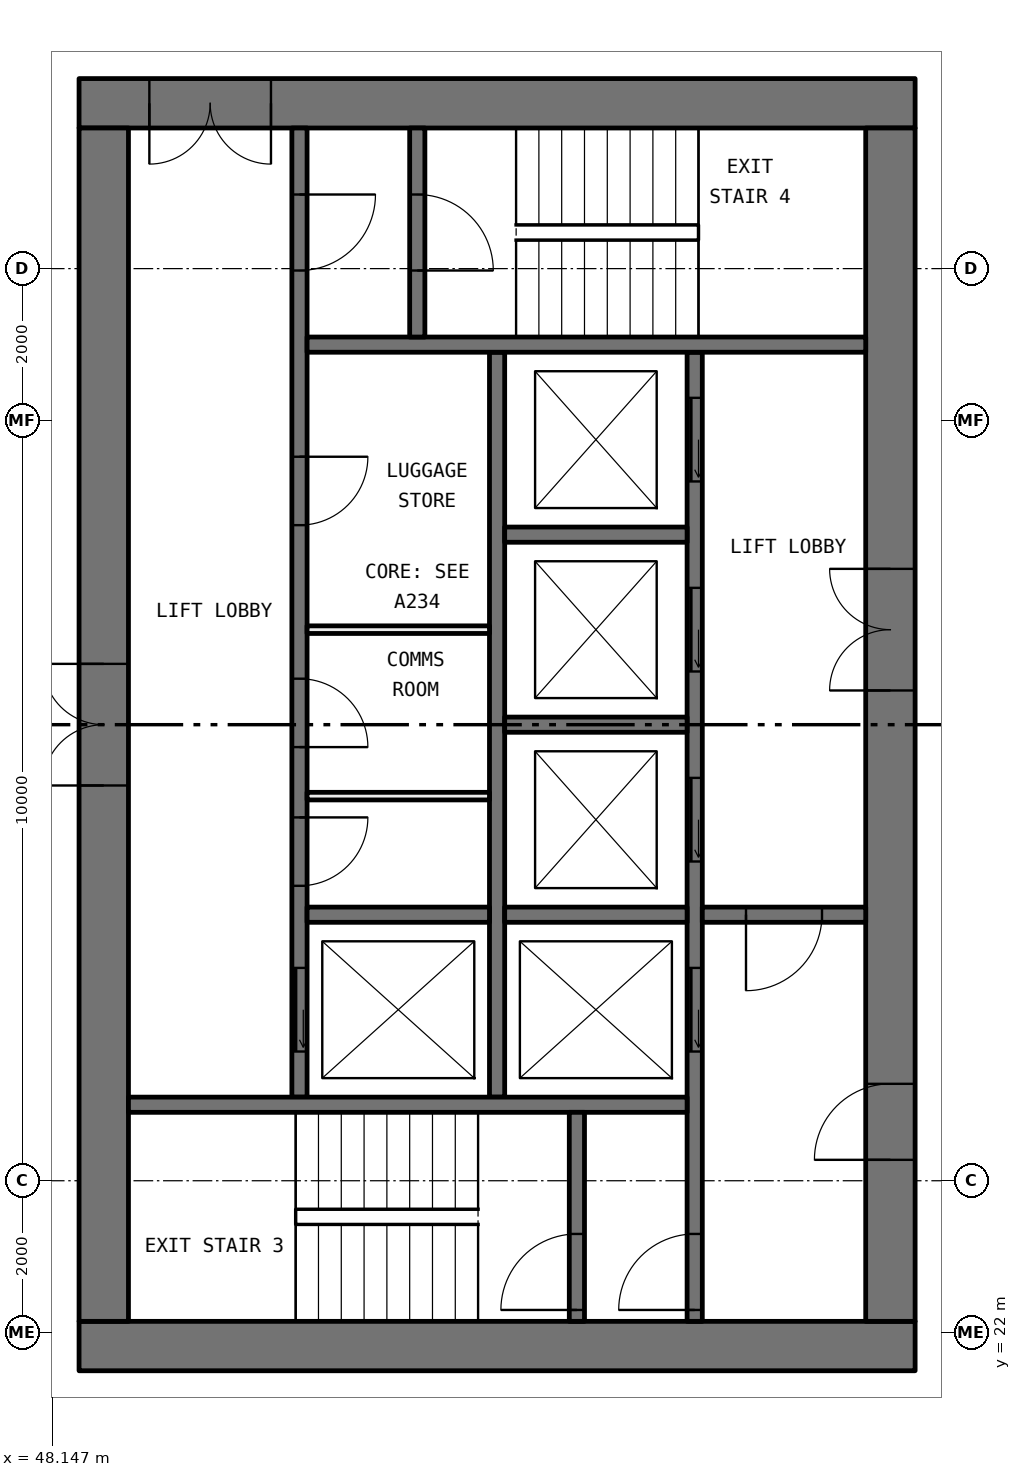
"""IFC4 building model, lengths in metres.
Left out: names, types, materials, properties, quantities, classifications, styles, units other than length and angle.
Written with IfcOpenShell. Run it as: python <this file> out.ifc"""

import sys

from ifc_helpers import new_model, si_unit, direction, frame, frame_2d, origin, place, context, subcontext, project, spatial, rectangle, extrude, element, fill, save


model = new_model("IFC4")
c1 = context("Model", 3, precision=1e-05, world=origin(), true_north=direction((0.0, 1.0)))
c2 = subcontext(c1, "Body", "Model", "MODEL_VIEW")
j1 = project(units=[si_unit("LENGTHUNIT", "METRE"), si_unit("PLANEANGLEUNIT", "RADIAN")], contexts=[c1])
p1 = place(None, origin())
s1 = spatial("IfcSite", under=j1, at=p1, CompositionType="ELEMENT")
p2 = place(p1, origin())
s2 = spatial("IfcBuilding", under=s1, at=p2, CompositionType="ELEMENT")
p3 = place(p2, frame((0.0, 0.0, 127.65)))
s3 = spatial("IfcBuildingStorey", under=s2, at=p3, CompositionType="ELEMENT", Elevation=127.65)
p4 = place(p3, frame((59.5, 21.825, 0.0), z_axis=(0.0, 0.0, 1.0), x_axis=(-1.0, 0.0, 0.0)))
e1 = element("IfcWall", 1, at=p4, inside=s3, PredefinedType="SHEAR", context=c2, shape_type="SweptSolid", body=[
    extrude(rectangle(XDim=11.0, YDim=0.65, at=frame_2d((5.5, 0.0))), origin(), (0.0, 0.0, 1.0), 3.05),
])
p5 = place(p3, frame((59.5, 38.175, 0.0), z_axis=(0.0, 0.0, 1.0), x_axis=(-1.0, 0.0, 0.0)))
e2 = element("IfcWall", 2, at=p5, inside=s3, PredefinedType="SHEAR", context=c2, shape_type="SweptSolid", body=[
    extrude(rectangle(XDim=11.0, YDim=0.65, at=frame_2d((5.5, 0.0))), origin(), (0.0, 0.0, 1.0), 3.05),
])
p6 = place(p5, frame((8.475, 0.0, 0.0)))
e3 = element("IfcOpeningElement", 3, at=p6, cuts=e2, PredefinedType="OPENING", context=c2, shape_type="SweptSolid", body=[
    extrude(rectangle(XDim=1.6, YDim=2.1, at=frame_2d((0.8, 1.05))), frame((0.0, 0.335, 0.0), z_axis=(0.0, -1.0, 0.0), x_axis=(1.0, 0.0, 0.0)), (0.0, 0.0, 1.0), 0.67),
])
p7 = place(p3, frame((59.175, 22.15, 0.0), z_axis=(0.0, 0.0, 1.0), x_axis=(0.0, 1.0, 0.0)))
e4 = element("IfcWall", 4, at=p7, inside=s3, PredefinedType="SHEAR", context=c2, shape_type="SweptSolid", body=[
    extrude(rectangle(XDim=15.7, YDim=0.65, at=frame_2d((7.85, 0.0))), origin(), (0.0, 0.0, 1.0), 3.05),
])
p8 = place(p7, frame((8.3, 0.0, 0.0)))
e5 = element("IfcOpeningElement", 5, at=p8, cuts=e4, PredefinedType="OPENING", context=c2, shape_type="SweptSolid", body=[
    extrude(rectangle(XDim=1.6, YDim=2.1, at=frame_2d((0.8, 1.05))), frame((0.0, 0.335, 0.0), z_axis=(0.0, -1.0, 0.0), x_axis=(1.0, 0.0, 0.0)), (0.0, 0.0, 1.0), 0.67),
])
p9 = place(p7, frame((2.125, 0.0, 0.0)))
e6 = element("IfcOpeningElement", 6, at=p9, cuts=e4, PredefinedType="OPENING", context=c2, shape_type="SweptSolid", body=[
    extrude(rectangle(XDim=1.0, YDim=2.1, at=frame_2d((0.5, 1.05))), frame((0.0, 0.335, 0.0), z_axis=(0.0, -1.0, 0.0), x_axis=(1.0, 0.0, 0.0)), (0.0, 0.0, 1.0), 0.67),
])
p10 = place(p3, frame((48.825, 22.15, 0.0), z_axis=(0.0, 0.0, 1.0), x_axis=(0.0, 1.0, 0.0)))
e7 = element("IfcWall", 7, at=p10, inside=s3, PredefinedType="SHEAR", context=c2, shape_type="SweptSolid", body=[
    extrude(rectangle(XDim=15.7, YDim=0.65, at=frame_2d((7.85, 0.0))), origin(), (0.0, 0.0, 1.0), 3.05),
])
p11 = place(p10, frame((7.05, 0.0, 0.0)))
e8 = element("IfcOpeningElement", 8, at=p11, cuts=e7, PredefinedType="OPENING", context=c2, shape_type="SweptSolid", body=[
    extrude(rectangle(XDim=1.6, YDim=2.1, at=frame_2d((0.8, 1.05))), frame((0.0, 0.335, 0.0), z_axis=(0.0, -1.0, 0.0), x_axis=(1.0, 0.0, 0.0)), (0.0, 0.0, 1.0), 0.67),
])
p12 = place(p3, frame((56.6, 22.15, 0.0), z_axis=(0.0, 0.0, 1.0), x_axis=(0.0, 1.0, 0.0)))
e9 = element("IfcWall", 9, at=p12, inside=s3, PredefinedType="SOLIDWALL", context=c2, shape_type="SweptSolid", body=[
    extrude(rectangle(XDim=12.75, YDim=0.2, at=frame_2d((6.375, 0.0))), origin(), (0.0, 0.0, 1.0), 3.05),
])
p13 = place(p12, frame((3.55, 0.0, 0.0)))
e10 = element("IfcOpeningElement", 10, at=p13, cuts=e9, PredefinedType="OPENING", context=c2, shape_type="SweptSolid", body=[
    extrude(rectangle(XDim=1.1, YDim=2.1, at=frame_2d((0.55, 1.05))), frame((0.0, 0.11, 0.0), z_axis=(0.0, -1.0, 0.0), x_axis=(1.0, 0.0, 0.0)), (0.0, 0.0, 1.0), 0.22),
])
p14 = place(p12, frame((6.05, 0.0, 0.0)))
e11 = element("IfcOpeningElement", 11, at=p14, cuts=e9, PredefinedType="OPENING", context=c2, shape_type="SweptSolid", body=[
    extrude(rectangle(XDim=1.1, YDim=2.1, at=frame_2d((0.55, 1.05))), frame((0.0, 0.11, 0.0), z_axis=(0.0, -1.0, 0.0), x_axis=(1.0, 0.0, 0.0)), (0.0, 0.0, 1.0), 0.22),
])
p15 = place(p12, frame((8.55, 0.0, 0.0)))
e12 = element("IfcOpeningElement", 12, at=p15, cuts=e9, PredefinedType="OPENING", context=c2, shape_type="SweptSolid", body=[
    extrude(rectangle(XDim=1.1, YDim=2.1, at=frame_2d((0.55, 1.05))), frame((0.0, 0.11, 0.0), z_axis=(0.0, -1.0, 0.0), x_axis=(1.0, 0.0, 0.0)), (0.0, 0.0, 1.0), 0.22),
])
p16 = place(p12, frame((11.05, 0.0, 0.0)))
e13 = element("IfcOpeningElement", 13, at=p16, cuts=e9, PredefinedType="OPENING", context=c2, shape_type="SweptSolid", body=[
    extrude(rectangle(XDim=1.1, YDim=2.1, at=frame_2d((0.55, 1.05))), frame((0.0, 0.11, 0.0), z_axis=(0.0, -1.0, 0.0), x_axis=(1.0, 0.0, 0.0)), (0.0, 0.0, 1.0), 0.22),
])
p17 = place(p12, frame((0.15, 0.0, 0.0)))
e14 = element("IfcOpeningElement", 14, at=p17, cuts=e9, PredefinedType="OPENING", context=c2, shape_type="SweptSolid", body=[
    extrude(rectangle(XDim=1.0, YDim=2.1, at=frame_2d((0.5, 1.05))), frame((0.0, 0.11, 0.0), z_axis=(0.0, -1.0, 0.0), x_axis=(1.0, 0.0, 0.0)), (0.0, 0.0, 1.0), 0.22),
])
p18 = place(p3, frame((51.4, 25.1, 0.0), z_axis=(0.0, 0.0, 1.0), x_axis=(0.0, 1.0, 0.0)))
e15 = element("IfcWall", 15, at=p18, inside=s3, PredefinedType="SOLIDWALL", context=c2, shape_type="SweptSolid", body=[
    extrude(rectangle(XDim=12.75, YDim=0.2, at=frame_2d((6.375, 0.0))), origin(), (0.0, 0.0, 1.0), 3.05),
])
p19 = place(p18, frame((0.6, 0.0, 0.0)))
e16 = element("IfcOpeningElement", 16, at=p19, cuts=e15, PredefinedType="OPENING", context=c2, shape_type="SweptSolid", body=[
    extrude(rectangle(XDim=1.1, YDim=2.1, at=frame_2d((0.55, 1.05))), frame((0.0, 0.11, 0.0), z_axis=(0.0, -1.0, 0.0), x_axis=(1.0, 0.0, 0.0)), (0.0, 0.0, 1.0), 0.22),
])
p20 = place(p18, frame((10.875, 0.0, 0.0)))
e17 = element("IfcOpeningElement", 17, at=p20, cuts=e15, PredefinedType="OPENING", context=c2, shape_type="SweptSolid", body=[
    extrude(rectangle(XDim=1.0, YDim=2.1, at=frame_2d((0.5, 1.05))), frame((0.0, 0.11, 0.0), z_axis=(0.0, -1.0, 0.0), x_axis=(1.0, 0.0, 0.0)), (0.0, 0.0, 1.0), 0.22),
])
p21 = place(p18, frame((2.78, 0.0, 0.0)))
e18 = element("IfcOpeningElement", 18, at=p21, cuts=e15, PredefinedType="OPENING", context=c2, shape_type="SweptSolid", body=[
    extrude(rectangle(XDim=0.9, YDim=2.1, at=frame_2d((0.45, 1.05))), frame((0.0, 0.11, 0.0), z_axis=(0.0, -1.0, 0.0), x_axis=(1.0, 0.0, 0.0)), (0.0, 0.0, 1.0), 0.22),
])
p22 = place(p18, frame((4.605, 0.0, 0.0)))
e19 = element("IfcOpeningElement", 19, at=p22, cuts=e15, PredefinedType="OPENING", context=c2, shape_type="SweptSolid", body=[
    extrude(rectangle(XDim=0.9, YDim=2.1, at=frame_2d((0.45, 1.05))), frame((0.0, 0.11, 0.0), z_axis=(0.0, -1.0, 0.0), x_axis=(1.0, 0.0, 0.0)), (0.0, 0.0, 1.0), 0.22),
])
p23 = place(p18, frame((7.525, 0.0, 0.0)))
e20 = element("IfcOpeningElement", 20, at=p23, cuts=e15, PredefinedType="OPENING", context=c2, shape_type="SweptSolid", body=[
    extrude(rectangle(XDim=0.9, YDim=2.1, at=frame_2d((0.45, 1.05))), frame((0.0, 0.11, 0.0), z_axis=(0.0, -1.0, 0.0), x_axis=(1.0, 0.0, 0.0)), (0.0, 0.0, 1.0), 0.22),
])
p24 = place(p3, frame((54.0, 25.1, 0.0), z_axis=(0.0, 0.0, 1.0), x_axis=(0.0, 1.0, 0.0)))
e21 = element("IfcWall", 21, at=p24, inside=s3, PredefinedType="SOLIDWALL", context=c2, shape_type="SweptSolid", body=[
    extrude(rectangle(XDim=9.8, YDim=0.2, at=frame_2d((4.9, 0.0))), origin(), (0.0, 0.0, 1.0), 3.05),
])
for number, where, z_axis, x_axis in (
    (22, (56.5, 25.0, 0.0), (0.0, 0.0, 1.0), (-1.0, 0.0, 0.0)),
    (23, (58.85, 35.0, 0.0), (0.0, 0.0, 1.0), (-1.0, 0.0, 0.0)),
):
    element("IfcWall", number, at=place(p3, frame(where, z_axis=z_axis, x_axis=x_axis)), inside=s3, PredefinedType="SOLIDWALL", context=c2, shape_type="SweptSolid", body=[
        extrude(rectangle(XDim=7.35, YDim=0.2, at=frame_2d((3.675, 0.0))), origin(), (0.0, 0.0, 1.0), 3.05),
    ])
p25 = place(p3, frame((58.85, 27.5, 0.0), z_axis=(0.0, 0.0, 1.0), x_axis=(-1.0, 0.0, 0.0)))
e24 = element("IfcWall", 24, at=p25, inside=s3, PredefinedType="SOLIDWALL", context=c2, shape_type="SweptSolid", body=[
    extrude(rectangle(XDim=2.15, YDim=0.2, at=frame_2d((1.075, 0.0))), origin(), (0.0, 0.0, 1.0), 3.05),
])
p26 = place(p25, frame((0.575, 0.0, 0.0)))
e25 = element("IfcOpeningElement", 25, at=p26, cuts=e24, PredefinedType="OPENING", context=c2, shape_type="SweptSolid", body=[
    extrude(rectangle(XDim=1.0, YDim=2.1, at=frame_2d((0.5, 1.05))), frame((0.0, 0.11, 0.0), z_axis=(0.0, -1.0, 0.0), x_axis=(1.0, 0.0, 0.0)), (0.0, 0.0, 1.0), 0.22),
])
p27 = place(p3, frame((55.05, 22.15, 0.0), z_axis=(0.0, 0.0, 1.0), x_axis=(0.0, 1.0, 0.0)))
e26 = element("IfcWall", 26, at=p27, inside=s3, PredefinedType="SOLIDWALL", context=c2, shape_type="SweptSolid", body=[
    extrude(rectangle(XDim=2.75, YDim=0.2, at=frame_2d((1.375, 0.0))), origin(), (0.0, 0.0, 1.0), 3.05),
])
p28 = place(p27, frame((0.15, 0.0, 0.0)))
e27 = element("IfcOpeningElement", 27, at=p28, cuts=e26, PredefinedType="OPENING", context=c2, shape_type="SweptSolid", body=[
    extrude(rectangle(XDim=1.0, YDim=2.1, at=frame_2d((0.5, 1.05))), frame((0.0, 0.11, 0.0), z_axis=(0.0, -1.0, 0.0), x_axis=(1.0, 0.0, 0.0)), (0.0, 0.0, 1.0), 0.22),
])
p29 = place(p3, frame((52.95, 35.1, 0.0), z_axis=(0.0, 0.0, 1.0), x_axis=(0.0, 1.0, 0.0)))
e28 = element("IfcWall", 28, at=p29, inside=s3, PredefinedType="SOLIDWALL", context=c2, shape_type="SweptSolid", body=[
    extrude(rectangle(XDim=2.75, YDim=0.2, at=frame_2d((1.375, 0.0))), origin(), (0.0, 0.0, 1.0), 3.05),
])
p30 = place(p29, frame((0.875, 0.0, 0.0)))
e29 = element("IfcOpeningElement", 29, at=p30, cuts=e28, PredefinedType="OPENING", context=c2, shape_type="SweptSolid", body=[
    extrude(rectangle(XDim=1.0, YDim=2.1, at=frame_2d((0.5, 1.05))), frame((0.0, 0.11, 0.0), z_axis=(0.0, -1.0, 0.0), x_axis=(1.0, 0.0, 0.0)), (0.0, 0.0, 1.0), 0.22),
])
for number, where, z_axis, x_axis in (
    (30, (56.5, 27.5, 0.0), (0.0, 0.0, 1.0), (-1.0, 0.0, 0.0)),
    (31, (56.5, 30.0, 0.0), (0.0, 0.0, 1.0), (-1.0, 0.0, 0.0)),
    (32, (56.5, 32.5, 0.0), (0.0, 0.0, 1.0), (-1.0, 0.0, 0.0)),
    (33, (53.9, 27.5, 0.0), (0.0, 0.0, 1.0), (-1.0, 0.0, 0.0)),
):
    element("IfcWall", number, at=place(p3, frame(where, z_axis=z_axis, x_axis=x_axis)), inside=s3, PredefinedType="SOLIDWALL", context=c2, shape_type="SweptSolid", body=[
        extrude(rectangle(XDim=2.4, YDim=0.2, at=frame_2d((1.2, 0.0))), origin(), (0.0, 0.0, 1.0), 3.05),
    ])
for number, where, z_axis, x_axis in (
    (34, (53.9, 29.06, 0.0), (0.0, 0.0, 1.0), (-1.0, 0.0, 0.0)),
    (35, (53.9, 31.25, 0.0), (0.0, 0.0, 1.0), (-1.0, 0.0, 0.0)),
):
    element("IfcWall", number, at=place(p3, frame(where, z_axis=z_axis, x_axis=x_axis)), inside=s3, PredefinedType="PARTITIONING", context=c2, shape_type="SweptSolid", body=[
        extrude(rectangle(XDim=2.4, YDim=0.1, at=frame_2d((1.2, 0.0))), origin(), (0.0, 0.0, 1.0), 3.05),
    ])
p31 = place(p19, origin())
e36 = element("IfcDoor", 36, at=p31, inside=s3, OperationType="SLIDING_TO_LEFT", PredefinedType="DOOR", context=c2, shape_type="SweptSolid", body=[
    extrude(rectangle(XDim=1.1, YDim=2.1, at=frame_2d((0.55, 1.05))), frame((0.0, 0.025, 0.0), z_axis=(0.0, -1.0, 0.0), x_axis=(1.0, 0.0, 0.0)), (0.0, 0.0, 1.0), 0.05),
])
fill(e16, e36)
p32 = place(p13, origin())
e37 = element("IfcDoor", 37, at=p32, inside=s3, OperationType="SLIDING_TO_LEFT", PredefinedType="DOOR", context=c2, shape_type="SweptSolid", body=[
    extrude(rectangle(XDim=1.1, YDim=2.1, at=frame_2d((0.55, 1.05))), frame((0.0, 0.025, 0.0), z_axis=(0.0, -1.0, 0.0), x_axis=(1.0, 0.0, 0.0)), (0.0, 0.0, 1.0), 0.05),
])
fill(e10, e37)
p33 = place(p14, origin())
e38 = element("IfcDoor", 38, at=p33, inside=s3, OperationType="SLIDING_TO_LEFT", PredefinedType="DOOR", context=c2, shape_type="SweptSolid", body=[
    extrude(rectangle(XDim=1.1, YDim=2.1, at=frame_2d((0.55, 1.05))), frame((0.0, 0.025, 0.0), z_axis=(0.0, -1.0, 0.0), x_axis=(1.0, 0.0, 0.0)), (0.0, 0.0, 1.0), 0.05),
])
fill(e11, e38)
p34 = place(p15, origin())
e39 = element("IfcDoor", 39, at=p34, inside=s3, OperationType="SLIDING_TO_LEFT", PredefinedType="DOOR", context=c2, shape_type="SweptSolid", body=[
    extrude(rectangle(XDim=1.1, YDim=2.1, at=frame_2d((0.55, 1.05))), frame((0.0, 0.025, 0.0), z_axis=(0.0, -1.0, 0.0), x_axis=(1.0, 0.0, 0.0)), (0.0, 0.0, 1.0), 0.05),
])
fill(e12, e39)
p35 = place(p16, origin())
e40 = element("IfcDoor", 40, at=p35, inside=s3, OperationType="SLIDING_TO_LEFT", PredefinedType="DOOR", context=c2, shape_type="SweptSolid", body=[
    extrude(rectangle(XDim=1.1, YDim=2.1, at=frame_2d((0.55, 1.05))), frame((0.0, 0.025, 0.0), z_axis=(0.0, -1.0, 0.0), x_axis=(1.0, 0.0, 0.0)), (0.0, 0.0, 1.0), 0.05),
])
fill(e13, e40)
p36 = place(p28, origin())
e41 = element("IfcDoor", 41, at=p36, inside=s3, OperationType="SINGLE_SWING_RIGHT", PredefinedType="DOOR", context=c2, shape_type="SweptSolid", body=[
    extrude(rectangle(XDim=1.0, YDim=2.1, at=frame_2d((0.5, 1.05))), frame((0.0, 0.025, 0.0), z_axis=(0.0, -1.0, 0.0), x_axis=(1.0, 0.0, 0.0)), (0.0, 0.0, 1.0), 0.05),
])
fill(e27, e41)
p37 = place(p17, origin())
e42 = element("IfcDoor", 42, at=p37, inside=s3, OperationType="SINGLE_SWING_RIGHT", PredefinedType="DOOR", context=c2, shape_type="SweptSolid", body=[
    extrude(rectangle(XDim=1.0, YDim=2.1, at=frame_2d((0.5, 1.05))), frame((0.0, 0.025, 0.0), z_axis=(0.0, -1.0, 0.0), x_axis=(1.0, 0.0, 0.0)), (0.0, 0.0, 1.0), 0.05),
])
fill(e14, e42)
p38 = place(p20, frame((1.0, 0.0, 0.0), x_axis=(-1.0, 0.0, 0.0)))
e43 = element("IfcDoor", 43, at=p38, inside=s3, OperationType="SINGLE_SWING_RIGHT", PredefinedType="DOOR", context=c2, shape_type="SweptSolid", body=[
    extrude(rectangle(XDim=1.0, YDim=2.1, at=frame_2d((0.5, 1.05))), frame((0.0, 0.025, 0.0), z_axis=(0.0, -1.0, 0.0), x_axis=(1.0, 0.0, 0.0)), (0.0, 0.0, 1.0), 0.05),
])
fill(e17, e43)
p39 = place(p30, frame((1.0, 0.0, 0.0), x_axis=(-1.0, 0.0, 0.0)))
e44 = element("IfcDoor", 44, at=p39, inside=s3, OperationType="SINGLE_SWING_LEFT", PredefinedType="DOOR", context=c2, shape_type="SweptSolid", body=[
    extrude(rectangle(XDim=1.0, YDim=2.1, at=frame_2d((0.5, 1.05))), frame((0.0, 0.025, 0.0), z_axis=(0.0, -1.0, 0.0), x_axis=(1.0, 0.0, 0.0)), (0.0, 0.0, 1.0), 0.05),
])
fill(e29, e44)
p40 = place(p26, origin())
e45 = element("IfcDoor", 45, at=p40, inside=s3, OperationType="SINGLE_SWING_LEFT", PredefinedType="DOOR", context=c2, shape_type="SweptSolid", body=[
    extrude(rectangle(XDim=1.0, YDim=2.1, at=frame_2d((0.5, 1.05))), frame((0.0, 0.025, 0.0), z_axis=(0.0, -1.0, 0.0), x_axis=(1.0, 0.0, 0.0)), (0.0, 0.0, 1.0), 0.05),
])
fill(e25, e45)
p41 = place(p8, origin())
e46 = element("IfcDoor", 46, at=p41, inside=s3, OperationType="DOUBLE_DOOR_SINGLE_SWING", PredefinedType="DOOR", context=c2, shape_type="SweptSolid", body=[
    extrude(rectangle(XDim=1.6, YDim=2.1, at=frame_2d((0.8, 1.05))), frame((0.0, 0.025, 0.0), z_axis=(0.0, -1.0, 0.0), x_axis=(1.0, 0.0, 0.0)), (0.0, 0.0, 1.0), 0.05),
])
fill(e5, e46)
p42 = place(p9, origin())
e47 = element("IfcDoor", 47, at=p42, inside=s3, OperationType="SINGLE_SWING_RIGHT", PredefinedType="DOOR", context=c2, shape_type="SweptSolid", body=[
    extrude(rectangle(XDim=1.0, YDim=2.1, at=frame_2d((0.5, 1.05))), frame((0.0, 0.025, 0.0), z_axis=(0.0, -1.0, 0.0), x_axis=(1.0, 0.0, 0.0)), (0.0, 0.0, 1.0), 0.05),
])
fill(e6, e47)
p43 = place(p6, origin())
e48 = element("IfcDoor", 48, at=p43, inside=s3, OperationType="DOUBLE_DOOR_SINGLE_SWING", PredefinedType="DOOR", context=c2, shape_type="SweptSolid", body=[
    extrude(rectangle(XDim=1.6, YDim=2.1, at=frame_2d((0.8, 1.05))), frame((0.0, 0.025, 0.0), z_axis=(0.0, -1.0, 0.0), x_axis=(1.0, 0.0, 0.0)), (0.0, 0.0, 1.0), 0.05),
])
fill(e3, e48)
p44 = place(p11, origin())
e49 = element("IfcDoor", 49, at=p44, inside=s3, OperationType="DOUBLE_DOOR_SINGLE_SWING", PredefinedType="DOOR", context=c2, shape_type="SweptSolid", body=[
    extrude(rectangle(XDim=1.6, YDim=2.1, at=frame_2d((0.8, 1.05))), frame((0.0, 0.025, 0.0), z_axis=(0.0, -1.0, 0.0), x_axis=(1.0, 0.0, 0.0)), (0.0, 0.0, 1.0), 0.05),
])
fill(e8, e49)
p45 = place(p21, frame((0.9, 0.0, 0.0), x_axis=(-1.0, 0.0, 0.0)))
e50 = element("IfcDoor", 50, at=p45, inside=s3, OperationType="SINGLE_SWING_RIGHT", PredefinedType="DOOR", context=c2, shape_type="SweptSolid", body=[
    extrude(rectangle(XDim=0.9, YDim=2.1, at=frame_2d((0.45, 1.05))), frame((0.0, 0.025, 0.0), z_axis=(0.0, -1.0, 0.0), x_axis=(1.0, 0.0, 0.0)), (0.0, 0.0, 1.0), 0.05),
])
fill(e18, e50)
p46 = place(p22, frame((0.9, 0.0, 0.0), x_axis=(-1.0, 0.0, 0.0)))
e51 = element("IfcDoor", 51, at=p46, inside=s3, OperationType="SINGLE_SWING_LEFT", PredefinedType="DOOR", context=c2, shape_type="SweptSolid", body=[
    extrude(rectangle(XDim=0.9, YDim=2.1, at=frame_2d((0.45, 1.05))), frame((0.0, 0.025, 0.0), z_axis=(0.0, -1.0, 0.0), x_axis=(1.0, 0.0, 0.0)), (0.0, 0.0, 1.0), 0.05),
])
fill(e19, e51)
p47 = place(p23, frame((0.9, 0.0, 0.0), x_axis=(-1.0, 0.0, 0.0)))
e52 = element("IfcDoor", 52, at=p47, inside=s3, OperationType="SINGLE_SWING_RIGHT", PredefinedType="DOOR", context=c2, shape_type="SweptSolid", body=[
    extrude(rectangle(XDim=0.9, YDim=2.1, at=frame_2d((0.45, 1.05))), frame((0.0, 0.025, 0.0), z_axis=(0.0, -1.0, 0.0), x_axis=(1.0, 0.0, 0.0)), (0.0, 0.0, 1.0), 0.05),
])
fill(e20, e52)
save(model, sys.argv[1])
